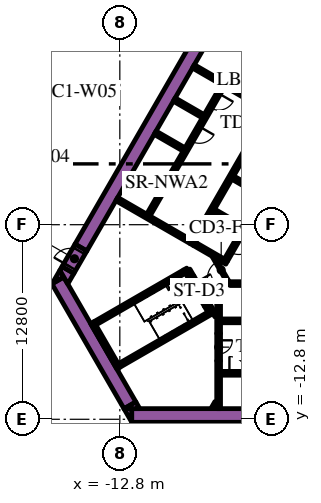
"""IFC4 building model, lengths in metres.
Left out: names, types, materials, properties, quantities, classifications, styles, units other than length and angle.
Written with IfcOpenShell. Run it as: python <this file> out.ifc"""

import sys

from ifc_helpers import new_model, si_unit, direction, frame, frame_2d, origin, place, context, subcontext, project, spatial, polyline, rectangle, outline, extrude, element, fill, save


model = new_model("IFC4")
c1 = context("Model", 3, precision=1e-05, world=origin(), true_north=direction((0.0, 1.0)))
c2 = subcontext(c1, "Body", "Model", "MODEL_VIEW")
j1 = project(units=[si_unit("LENGTHUNIT", "METRE"), si_unit("PLANEANGLEUNIT", "RADIAN")], contexts=[c1])
p1 = place(None, origin())
s1 = spatial("IfcSite", under=j1, at=p1, CompositionType="ELEMENT")
p2 = place(p1, origin())
s2 = spatial("IfcBuilding", under=s1, at=p2, CompositionType="ELEMENT")
p3 = place(p2, frame((0.0, 0.0, 21.6)))
s3 = spatial("IfcBuildingStorey", under=s2, at=p3, CompositionType="ELEMENT", Elevation=21.6)
p4 = place(p3, frame((-15.36, -1.503, 0.0), z_axis=(0.0, 0.0, 1.0), x_axis=(0.50000389221, 0.866023156604, 0.0)))
e1 = element("IfcWall", 1, at=p4, inside=s3, PredefinedType="SOLIDWALL", context=c2, shape_type="SweptSolid", body=[
    extrude(rectangle(XDim=21.0, YDim=0.9, at=frame_2d((10.5, 0.0))), origin(), (0.0, 0.0, 1.0), 6.0),
])
p5 = place(p3, frame((-12.019, -12.55, 0.0), z_axis=(0.0, 0.0, 1.0), x_axis=(1.0, 0.0, 0.0)))
e2 = element("IfcWall", 2, at=p5, inside=s3, PredefinedType="SOLIDWALL", context=c2, shape_type="SweptSolid", body=[
    extrude(rectangle(XDim=21.63, YDim=0.9, at=frame_2d((10.815, 0.0))), origin(), (0.0, 0.0, 1.0), 6.0),
])
p6 = place(p3, origin())
e3 = element("IfcWall", 3, at=p6, inside=s3, PredefinedType="SOLIDWALL", context=c2, shape_type="SweptSolid", body=[
    extrude(outline(polyline([(-12.529, -12.1), (-12.021, -12.1), (-12.021, -12.98), (-12.529, -12.1)])), origin(), (0.0, 0.0, 1.0), 6.0),
])
p7 = place(p3, frame((-12.134, -11.883, 0.0), z_axis=(0.0, 0.0, 1.0), x_axis=(-0.500005339912, 0.866022320763, 0.0)))
e4 = element("IfcWall", 4, at=p7, inside=s3, PredefinedType="SOLIDWALL", context=c2, shape_type="SweptSolid", body=[
    extrude(rectangle(XDim=9.488, YDim=0.9, at=frame_2d((4.744, 0.0))), origin(), (0.0, 0.0, 1.0), 6.0),
])
e5 = element("IfcWall", 5, at=p6, inside=s3, PredefinedType="SOLIDWALL", context=c2, shape_type="SweptSolid", body=[
    extrude(outline(polyline([(-16.489, -3.44), (-17.251, -3.88), (-16.743, -3.0), (-16.489, -3.44)])), origin(), (0.0, 0.0, 1.0), 6.0),
])
e6 = element("IfcWall", 6, at=p6, inside=s3, PredefinedType="SOLIDWALL", context=c2, shape_type="SweptSolid", body=[
    extrude(outline(polyline([(-11.489, -12.1), (-12.505, -12.1), (-11.743, -11.66), (-11.489, -12.1)])), origin(), (0.0, 0.0, 1.0), 6.0),
])
e7 = element("IfcWall", 7, at=p6, inside=s3, PredefinedType="SOLIDWALL", context=c2, shape_type="SweptSolid", body=[
    extrude(outline(polyline([(-15.82, -3.201), (-16.223, -3.9), (-16.743, -3.0), (-16.599, -2.751), (-15.82, -3.201)])), origin(), (0.0, 0.0, 1.0), 6.0),
])
p8 = place(p3, frame((-12.885, -9.431, 0.0), z_axis=(0.0, 0.0, 1.0), x_axis=(-0.500020560727, 0.866013532718, 0.0)))
e8 = element("IfcWall", 8, at=p8, inside=s3, PredefinedType="SOLIDWALL", context=c2, shape_type="SweptSolid", body=[
    extrude(rectangle(XDim=3.45, YDim=0.25, at=frame_2d((1.725, 0.0))), origin(), (0.0, 0.0, 1.0), 6.0),
])
p9 = place(p3, frame((-14.44, -6.49, 0.0), z_axis=(0.0, 0.0, 1.0), x_axis=(0.866022966069, 0.500004222222, 0.0)))
e9 = element("IfcWall", 9, at=p9, inside=s3, PredefinedType="SOLIDWALL", context=c2, shape_type="SweptSolid", body=[
    extrude(rectangle(XDim=6.8, YDim=0.25, at=frame_2d((3.4, 0.0))), origin(), (0.0, 0.0, 1.0), 6.0),
])
p10 = place(p3, frame((-8.168, -3.503, 0.0), z_axis=(0.0, 0.0, 1.0), x_axis=(-0.499952099219, 0.866053057547, 0.0)))
e10 = element("IfcWall", 10, at=p10, inside=s3, PredefinedType="SOLIDWALL", context=c2, shape_type="SweptSolid", body=[
    extrude(rectangle(XDim=0.675, YDim=0.25, at=frame_2d((0.337, 0.0))), origin(), (0.0, 0.0, 1.0), 6.0),
])
p11 = place(p3, frame((-12.84, -9.261, 0.0), z_axis=(0.0, 0.0, 1.0), x_axis=(0.866016039709, 0.500016218704, 0.0)))
e11 = element("IfcWall", 11, at=p11, inside=s3, PredefinedType="SOLIDWALL", context=c2, shape_type="SweptSolid", body=[
    extrude(rectangle(XDim=7.05, YDim=0.25, at=frame_2d((3.525, 0.0))), origin(), (0.0, 0.0, 1.0), 6.0),
])
p12 = place(p3, frame((-6.905, -5.69, 0.0), z_axis=(0.0, 0.0, 1.0), x_axis=(-0.500402024738, 0.865793170242, 0.0)))
e12 = element("IfcWall", 12, at=p12, inside=s3, PredefinedType="SOLIDWALL", context=c2, shape_type="SweptSolid", body=[
    extrude(rectangle(XDim=0.425, YDim=0.25, at=frame_2d((0.212, 0.0))), origin(), (0.0, 0.0, 1.0), 6.0),
])
p13 = place(p3, frame((-6.3, -12.1, 0.0), z_axis=(0.0, 0.0, 1.0), x_axis=(0.0, 1.0, 0.0)))
e13 = element("IfcWall", 13, at=p13, inside=s3, PredefinedType="SOLIDWALL", context=c2, shape_type="SweptSolid", body=[
    extrude(rectangle(XDim=3.146, YDim=0.25, at=frame_2d((1.573, 0.0))), origin(), (0.0, 0.0, 1.0), 6.0),
])
p14 = place(p3, frame((-5.545, -3.875, 0.0), z_axis=(0.0, 0.0, 1.0), x_axis=(1.0, 0.0, 0.0)))
e14 = element("IfcWall", 14, at=p14, inside=s3, PredefinedType="SOLIDWALL", context=c2, shape_type="SweptSolid", body=[
    extrude(rectangle(XDim=11.97, YDim=0.25, at=frame_2d((5.985, 0.0))), origin(), (0.0, 0.0, 1.0), 6.0),
])
p15 = place(p3, frame((-6.425, -3.875, 0.0), z_axis=(0.0, 0.0, 1.0), x_axis=(1.0, 0.0, 0.0)))
e15 = element("IfcWall", 15, at=p15, inside=s3, PredefinedType="SOLIDWALL", context=c2, shape_type="SweptSolid", body=[
    extrude(rectangle(XDim=0.658, YDim=0.25, at=frame_2d((0.329, 0.0))), origin(), (0.0, 0.0, 1.0), 6.0),
])
p16 = place(p3, frame((-6.3, -4.0, 0.0), z_axis=(0.0, 0.0, 1.0), x_axis=(0.0, -1.0, 0.0)))
e16 = element("IfcWall", 16, at=p16, inside=s3, PredefinedType="SOLIDWALL", context=c2, shape_type="SweptSolid", body=[
    extrude(rectangle(XDim=3.154, YDim=0.25, at=frame_2d((1.577, 0.0))), origin(), (0.0, 0.0, 1.0), 6.0),
])
p17 = place(p3, frame((-8.06, -1.311, 0.0), z_axis=(0.0, 0.0, 1.0), x_axis=(0.50000273126, 0.866023826885, 0.0)))
e17 = element("IfcWall", 17, at=p17, inside=s3, PredefinedType="SOLIDWALL", context=c2, shape_type="SweptSolid", body=[
    extrude(rectangle(XDim=10.33, YDim=0.25, at=frame_2d((5.165, 0.0))), origin(), (0.0, 0.0, 1.0), 6.0),
])
for number, where, z_axis, x_axis in (
    (18, (-5.369, 3.1, 0.0), (0.0, 0.0, 1.0), (0.866, -0.5, 0.0)),
    (19, (-4.724, -0.182, 0.0), (0.0, 0.0, 1.0), (-0.866, 0.5, 0.0)),
):
    element("IfcWall", number, at=place(p3, frame(where, z_axis=z_axis, x_axis=x_axis)), inside=s3, PredefinedType="SOLIDWALL", context=c2, shape_type="SweptSolid", body=[
        extrude(rectangle(XDim=2.2, YDim=0.25, at=frame_2d((1.1, 0.0))), origin(), (0.0, 0.0, 1.0), 6.0),
    ])
e20 = element("IfcWall", 20, at=p6, inside=s3, PredefinedType="SOLIDWALL", context=c2, shape_type="SweptSolid", body=[
    extrude(outline(polyline([(-5.922, -2.257), (-5.922, -2.257), (-5.705, -2.382), (-5.83, -2.598), (-6.483, -2.221), (-6.591, -2.033), (-6.591, -2.033), (-6.7, -2.096), (-7.952, -1.373), (-7.827, -1.156), (-5.922, -2.257)])), origin(), (0.0, 0.0, 1.0), 6.0),
])
p18 = place(p3, frame((-8.106, -1.14, 0.0), z_axis=(0.0, 0.0, 1.0), x_axis=(-0.866000643155, 0.500042884217, 0.0)))
e21 = element("IfcWall", 21, at=p18, inside=s3, PredefinedType="SOLIDWALL", context=c2, shape_type="SweptSolid", body=[
    extrude(rectangle(XDim=5.65, YDim=0.25, at=frame_2d((2.825, 0.0))), origin(), (0.0, 0.0, 1.0), 6.0),
])
for number, where, z_axis, x_axis in (
    (22, (-8.574, 4.95, 0.0), (0.0, 0.0, 1.0), (-0.866, 0.5, 0.0)),
    (23, (-7.314, 7.132, 0.0), (0.0, 0.0, 1.0), (-0.866, 0.5, 0.0)),
):
    element("IfcWall", number, at=place(p3, frame(where, z_axis=z_axis, x_axis=x_axis)), inside=s3, PredefinedType="SOLIDWALL", context=c2, shape_type="SweptSolid", body=[
        extrude(rectangle(XDim=2.2, YDim=0.25, at=frame_2d((1.1, 0.0))), origin(), (0.0, 0.0, 1.0), 6.0),
    ])
p19 = place(p3, frame((-7.959, 10.415, 0.0), z_axis=(0.0, 0.0, 1.0), x_axis=(0.866020958405, -0.500007699544, 0.0)))
e24 = element("IfcWall", 24, at=p19, inside=s3, PredefinedType="SOLIDWALL", context=c2, shape_type="SweptSolid", body=[
    extrude(rectangle(XDim=4.1, YDim=0.25, at=frame_2d((2.05, 0.0))), origin(), (0.0, 0.0, 1.0), 6.0),
])
p20 = place(p3, frame((-6.708, -12.068, 0.0), z_axis=(0.0, 0.0, 1.0), x_axis=(0.500000789788, 0.8660249478, 0.0)))
e25 = element("IfcWall", 25, at=p20, inside=s3, PredefinedType="PARTITIONING", context=c2, shape_type="SweptSolid", body=[
    extrude(rectangle(XDim=0.456, YDim=0.15, at=frame_2d((0.228, 0.0))), origin(), (0.0, 0.0, 1.0), 4.85),
])
p21 = place(p3, frame((-6.534, -12.068, 0.0), z_axis=(0.0, 0.0, 1.0), x_axis=(0.500240224089, 0.865886665912, 0.0)))
e26 = element("IfcWall", 26, at=p21, inside=s3, PredefinedType="PARTITIONING", context=c2, shape_type="SweptSolid", body=[
    extrude(rectangle(XDim=0.109, YDim=0.15, at=frame_2d((0.054, 0.0))), origin(), (0.0, 0.0, 1.0), 4.85),
])
p22 = place(p3, frame((-6.48, -6.027, 0.0), z_axis=(0.0, 0.0, 1.0), x_axis=(-0.499927229454, 0.866067413802, 0.0)))
e27 = element("IfcWall", 27, at=p22, inside=s3, PredefinedType="PARTITIONING", context=c2, shape_type="SweptSolid", body=[
    extrude(rectangle(XDim=0.929, YDim=0.15, at=frame_2d((0.464, 0.0))), origin(), (0.0, 0.0, 1.0), 6.0),
])
p23 = place(p3, frame((-8.252, -2.958, 0.0), z_axis=(0.0, 0.0, 1.0), x_axis=(0.500174715838, -0.865924508047, 0.0)))
e28 = element("IfcWall", 28, at=p23, inside=s3, PredefinedType="PARTITIONING", context=c2, shape_type="SweptSolid", body=[
    extrude(rectangle(XDim=0.514, YDim=0.15, at=frame_2d((0.257, 0.0))), origin(), (0.0, 0.0, 1.0), 4.85),
])
p24 = place(p3, frame((-6.175, -9.775, 0.0), z_axis=(0.0, 0.0, 1.0), x_axis=(1.0, 0.0, 0.0)))
e29 = element("IfcWall", 29, at=p24, inside=s3, PredefinedType="SOLIDWALL", context=c2, shape_type="SweptSolid", body=[
    extrude(rectangle(XDim=12.35, YDim=0.25, at=frame_2d((6.175, 0.0))), origin(), (0.0, 0.0, 1.0), 6.0),
])
p25 = place(p24, frame((0.585, 0.0, 0.0)))
e30 = element("IfcOpeningElement", 30, at=p25, cuts=e29, PredefinedType="OPENING", context=c2, shape_type="SweptSolid", body=[
    extrude(rectangle(XDim=1.1, YDim=2.1, at=frame_2d((0.55, 1.05))), frame((0.0, 0.135, 0.0), z_axis=(0.0, -1.0, 0.0), x_axis=(1.0, 0.0, 0.0)), (0.0, 0.0, 1.0), 0.27),
])
p26 = place(p24, frame((3.105, 0.0, 0.0)))
e31 = element("IfcOpeningElement", 31, at=p26, cuts=e29, PredefinedType="OPENING", context=c2, shape_type="SweptSolid", body=[
    extrude(rectangle(XDim=1.1, YDim=2.1, at=frame_2d((0.55, 1.05))), frame((0.0, 0.135, 0.0), z_axis=(0.0, -1.0, 0.0), x_axis=(1.0, 0.0, 0.0)), (0.0, 0.0, 1.0), 0.27),
])
p27 = place(p24, frame((5.625, 0.0, 0.0)))
e32 = element("IfcOpeningElement", 32, at=p27, cuts=e29, PredefinedType="OPENING", context=c2, shape_type="SweptSolid", body=[
    extrude(rectangle(XDim=1.1, YDim=2.1, at=frame_2d((0.55, 1.05))), frame((0.0, 0.135, 0.0), z_axis=(0.0, -1.0, 0.0), x_axis=(1.0, 0.0, 0.0)), (0.0, 0.0, 1.0), 0.27),
])
p28 = place(p24, frame((8.145, 0.0, 0.0)))
e33 = element("IfcOpeningElement", 33, at=p28, cuts=e29, PredefinedType="OPENING", context=c2, shape_type="SweptSolid", body=[
    extrude(rectangle(XDim=1.1, YDim=2.1, at=frame_2d((0.55, 1.05))), frame((0.0, 0.135, 0.0), z_axis=(0.0, -1.0, 0.0), x_axis=(1.0, 0.0, 0.0)), (0.0, 0.0, 1.0), 0.27),
])
p29 = place(p24, frame((10.665, 0.0, 0.0)))
e34 = element("IfcOpeningElement", 34, at=p29, cuts=e29, PredefinedType="OPENING", context=c2, shape_type="SweptSolid", body=[
    extrude(rectangle(XDim=1.1, YDim=2.1, at=frame_2d((0.55, 1.05))), frame((0.0, 0.135, 0.0), z_axis=(0.0, -1.0, 0.0), x_axis=(1.0, 0.0, 0.0)), (0.0, 0.0, 1.0), 0.27),
])
p30 = place(p3, frame((-6.175, -6.325, 0.0), z_axis=(0.0, 0.0, 1.0), x_axis=(1.0, 0.0, 0.0)))
e35 = element("IfcWall", 35, at=p30, inside=s3, PredefinedType="SOLIDWALL", context=c2, shape_type="SweptSolid", body=[
    extrude(rectangle(XDim=12.35, YDim=0.25, at=frame_2d((6.175, 0.0))), origin(), (0.0, 0.0, 1.0), 6.0),
])
p31 = place(p30, frame((3.205, 0.0, 0.0)))
e36 = element("IfcOpeningElement", 36, at=p31, cuts=e35, PredefinedType="OPENING", context=c2, shape_type="SweptSolid", body=[
    extrude(rectangle(XDim=0.9, YDim=2.1, at=frame_2d((0.45, 1.05))), frame((0.0, 0.135, 0.0), z_axis=(0.0, -1.0, 0.0), x_axis=(1.0, 0.0, 0.0)), (0.0, 0.0, 1.0), 0.27),
])
p32 = place(p30, frame((8.145, 0.0, 0.0)))
e37 = element("IfcOpeningElement", 37, at=p32, cuts=e35, PredefinedType="OPENING", context=c2, shape_type="SweptSolid", body=[
    extrude(rectangle(XDim=1.1, YDim=2.1, at=frame_2d((0.55, 1.05))), frame((0.0, 0.135, 0.0), z_axis=(0.0, -1.0, 0.0), x_axis=(1.0, 0.0, 0.0)), (0.0, 0.0, 1.0), 0.27),
])
p33 = place(p30, frame((10.665, 0.0, 0.0)))
e38 = element("IfcOpeningElement", 38, at=p33, cuts=e35, PredefinedType="OPENING", context=c2, shape_type="SweptSolid", body=[
    extrude(rectangle(XDim=1.1, YDim=2.1, at=frame_2d((0.55, 1.05))), frame((0.0, 0.135, 0.0), z_axis=(0.0, -1.0, 0.0), x_axis=(1.0, 0.0, 0.0)), (0.0, 0.0, 1.0), 0.27),
])
p34 = place(p3, frame((-6.008, 9.144, 0.0), z_axis=(0.0, 0.0, 1.0), x_axis=(-0.500006956611, -0.866021387346, 0.0)))
e39 = element("IfcWall", 39, at=p34, inside=s3, PredefinedType="SOLIDWALL", context=c2, shape_type="SweptSolid", body=[
    extrude(rectangle(XDim=9.83, YDim=0.25, at=frame_2d((4.915, 0.0))), origin(), (0.0, 0.0, 1.0), 6.0),
])
p35 = place(p34, frame((0.585, 0.0, 0.0)))
e40 = element("IfcOpeningElement", 40, at=p35, cuts=e39, PredefinedType="OPENING", context=c2, shape_type="SweptSolid", body=[
    extrude(rectangle(XDim=1.1, YDim=2.1, at=frame_2d((0.55, 1.05))), frame((0.0, 0.135, 0.0), z_axis=(0.0, -1.0, 0.0), x_axis=(1.0, 0.0, 0.0)), (0.0, 0.0, 1.0), 0.27),
])
p36 = place(p34, frame((3.105, 0.0, 0.0)))
e41 = element("IfcOpeningElement", 41, at=p36, cuts=e39, PredefinedType="OPENING", context=c2, shape_type="SweptSolid", body=[
    extrude(rectangle(XDim=1.1, YDim=2.1, at=frame_2d((0.55, 1.05))), frame((0.0, 0.135, 0.0), z_axis=(0.0, -1.0, 0.0), x_axis=(1.0, 0.0, 0.0)), (0.0, 0.0, 1.0), 0.27),
])
p37 = place(p34, frame((6.985, 0.0, 0.0)))
e42 = element("IfcOpeningElement", 42, at=p37, cuts=e39, PredefinedType="OPENING", context=c2, shape_type="SweptSolid", body=[
    extrude(rectangle(XDim=0.9, YDim=2.1, at=frame_2d((0.45, 1.05))), frame((0.0, 0.135, 0.0), z_axis=(0.0, -1.0, 0.0), x_axis=(1.0, 0.0, 0.0)), (0.0, 0.0, 1.0), 0.27),
])
p38 = place(p3, frame((-0.898, 6.194, 0.0), z_axis=(0.0, 0.0, 1.0), x_axis=(-0.499996202215, -0.866027596426, 0.0)))
e43 = element("IfcWall", 43, at=p38, inside=s3, PredefinedType="SOLIDWALL", context=c2, shape_type="SweptSolid", body=[
    extrude(rectangle(XDim=9.83, YDim=0.25, at=frame_2d((4.915, 0.0))), origin(), (0.0, 0.0, 1.0), 6.0),
])
p39 = place(p38, frame((0.585, 0.0, 0.0)))
e44 = element("IfcOpeningElement", 44, at=p39, cuts=e43, PredefinedType="OPENING", context=c2, shape_type="SweptSolid", body=[
    extrude(rectangle(XDim=1.1, YDim=2.1, at=frame_2d((0.55, 1.05))), frame((0.0, 0.135, 0.0), z_axis=(0.0, -1.0, 0.0), x_axis=(1.0, 0.0, 0.0)), (0.0, 0.0, 1.0), 0.27),
])
p40 = place(p38, frame((3.105, 0.0, 0.0)))
e45 = element("IfcOpeningElement", 45, at=p40, cuts=e43, PredefinedType="OPENING", context=c2, shape_type="SweptSolid", body=[
    extrude(rectangle(XDim=1.1, YDim=2.1, at=frame_2d((0.55, 1.05))), frame((0.0, 0.135, 0.0), z_axis=(0.0, -1.0, 0.0), x_axis=(1.0, 0.0, 0.0)), (0.0, 0.0, 1.0), 0.27),
])
p41 = place(p38, frame((5.625, 0.0, 0.0)))
e46 = element("IfcOpeningElement", 46, at=p41, cuts=e43, PredefinedType="OPENING", context=c2, shape_type="SweptSolid", body=[
    extrude(rectangle(XDim=1.1, YDim=2.1, at=frame_2d((0.55, 1.05))), frame((0.0, 0.135, 0.0), z_axis=(0.0, -1.0, 0.0), x_axis=(1.0, 0.0, 0.0)), (0.0, 0.0, 1.0), 0.27),
])
p42 = place(p38, frame((8.145, 0.0, 0.0)))
e47 = element("IfcOpeningElement", 47, at=p42, cuts=e43, PredefinedType="OPENING", context=c2, shape_type="SweptSolid", body=[
    extrude(rectangle(XDim=1.1, YDim=2.1, at=frame_2d((0.55, 1.05))), frame((0.0, 0.135, 0.0), z_axis=(0.0, -1.0, 0.0), x_axis=(1.0, 0.0, 0.0)), (0.0, 0.0, 1.0), 0.27),
])
p43 = place(p3, frame((-8.103, -3.466, 0.0), z_axis=(0.0, 0.0, 1.0), x_axis=(0.500078061341, -0.865980330357, 0.0)))
e48 = element("IfcWall", 48, at=p43, inside=s3, PredefinedType="SOLIDWALL", context=c2, shape_type="SweptSolid", body=[
    extrude(rectangle(XDim=2.1, YDim=0.4, at=frame_2d((1.05, 0.0))), origin(), (0.0, 0.0, 1.0), 6.0),
])
p44 = place(p43, frame((0.45, 0.0, 0.0)))
e49 = element("IfcOpeningElement", 49, at=p44, cuts=e48, PredefinedType="OPENING", context=c2, shape_type="SweptSolid", body=[
    extrude(rectangle(XDim=1.2, YDim=2.1, at=frame_2d((0.6, 1.05))), frame((0.0, 0.21, 0.0), z_axis=(0.0, -1.0, 0.0), x_axis=(1.0, 0.0, 0.0)), (0.0, 0.0, 1.0), 0.42),
])
p45 = place(p3, frame((-6.3, -7.154, 0.0), z_axis=(0.0, 0.0, 1.0), x_axis=(0.0, -1.0, 0.0)))
e50 = element("IfcWall", 50, at=p45, inside=s3, PredefinedType="SOLIDWALL", context=c2, shape_type="SweptSolid", body=[
    extrude(rectangle(XDim=1.8, YDim=0.25, at=frame_2d((0.9, 0.0))), origin(), (0.0, 0.0, 1.0), 6.0),
])
p46 = place(p45, frame((0.45, 0.0, 0.0)))
e51 = element("IfcOpeningElement", 51, at=p46, cuts=e50, PredefinedType="OPENING", context=c2, shape_type="SweptSolid", body=[
    extrude(rectangle(XDim=0.9, YDim=2.1, at=frame_2d((0.45, 1.05))), frame((0.0, 0.135, 0.0), z_axis=(0.0, -1.0, 0.0), x_axis=(1.0, 0.0, 0.0)), (0.0, 0.0, 1.0), 0.27),
])
p47 = place(p3, frame((-5.606, -3.89, 0.0), z_axis=(0.0, 0.0, 1.0), x_axis=(-0.500027713859, 0.866009402589, 0.0)))
e52 = element("IfcWall", 52, at=p47, inside=s3, PredefinedType="PARTITIONING", context=c2, shape_type="SweptSolid", body=[
    extrude(rectangle(XDim=2.1, YDim=0.15, at=frame_2d((1.05, 0.0))), origin(), (0.0, 0.0, 1.0), 4.85),
])
p48 = place(p47, frame((0.45, 0.0, 0.0)))
e53 = element("IfcOpeningElement", 53, at=p48, cuts=e52, PredefinedType="OPENING", context=c2, shape_type="SweptSolid", body=[
    extrude(rectangle(XDim=1.2, YDim=2.1, at=frame_2d((0.6, 1.05))), frame((0.0, 0.085, 0.0), z_axis=(0.0, -1.0, 0.0), x_axis=(1.0, 0.0, 0.0)), (0.0, 0.0, 1.0), 0.17),
])
p49 = place(p3, frame((-16.209, -2.976, 0.0), z_axis=(0.0, 0.0, 1.0), x_axis=(0.499954529098, 0.86605165483, 0.0)))
e54 = element("IfcWall", 54, at=p49, inside=s3, PredefinedType="SOLIDWALL", context=c2, shape_type="SweptSolid", body=[
    extrude(rectangle(XDim=1.7, YDim=0.9, at=frame_2d((0.85, 0.0))), origin(), (0.0, 0.0, 1.0), 6.0),
])
p50 = place(p49, frame((0.25, 0.0, 0.0)))
e55 = element("IfcOpeningElement", 55, at=p50, cuts=e54, PredefinedType="OPENING", context=c2, shape_type="SweptSolid", body=[
    extrude(rectangle(XDim=1.2, YDim=2.1, at=frame_2d((0.6, 1.05))), frame((0.0, 0.46, 0.0), z_axis=(0.0, -1.0, 0.0), x_axis=(1.0, 0.0, 0.0)), (0.0, 0.0, 1.0), 0.92),
])
p51 = place(p3, frame((-6.875, 40.198, 0.0), z_axis=(0.0, 0.0, 1.0), x_axis=(-0.500000527961, -0.866025098966, 0.0)))
e56 = element("IfcWall", 56, at=p51, inside=s3, PredefinedType="SOLIDWALL", context=c2, shape_type="SweptSolid", body=[
    extrude(rectangle(XDim=62.75, YDim=0.25, at=frame_2d((31.375, 0.0))), origin(), (0.0, 0.0, 1.0), 4.5),
])
p52 = place(p25, origin())
e57 = element("IfcDoor", 57, at=p52, inside=s3, OperationType="DOUBLE_DOOR_SLIDING", PredefinedType="DOOR", context=c2, shape_type="SweptSolid", body=[
    extrude(rectangle(XDim=1.1, YDim=2.1, at=frame_2d((0.55, 1.05))), frame((0.0, 0.025, 0.0), z_axis=(0.0, -1.0, 0.0), x_axis=(1.0, 0.0, 0.0)), (0.0, 0.0, 1.0), 0.05),
])
fill(e30, e57)
p53 = place(p35, origin())
e58 = element("IfcDoor", 58, at=p53, inside=s3, OperationType="DOUBLE_DOOR_SLIDING", PredefinedType="DOOR", context=c2, shape_type="SweptSolid", body=[
    extrude(rectangle(XDim=1.1, YDim=2.1, at=frame_2d((0.55, 1.05))), frame((0.0, 0.025, 0.0), z_axis=(0.0, -1.0, 0.0), x_axis=(1.0, 0.0, 0.0)), (0.0, 0.0, 1.0), 0.05),
])
fill(e40, e58)
p54 = place(p36, origin())
e59 = element("IfcDoor", 59, at=p54, inside=s3, OperationType="DOUBLE_DOOR_SLIDING", PredefinedType="DOOR", context=c2, shape_type="SweptSolid", body=[
    extrude(rectangle(XDim=1.1, YDim=2.1, at=frame_2d((0.55, 1.05))), frame((0.0, 0.025, 0.0), z_axis=(0.0, -1.0, 0.0), x_axis=(1.0, 0.0, 0.0)), (0.0, 0.0, 1.0), 0.05),
])
fill(e41, e59)
p55 = place(p37, origin())
e60 = element("IfcDoor", 60, at=p55, inside=s3, OperationType="SINGLE_SWING_LEFT", PredefinedType="DOOR", context=c2, shape_type="SweptSolid", body=[
    extrude(rectangle(XDim=0.9, YDim=2.1, at=frame_2d((0.45, 1.05))), frame((0.0, 0.025, 0.0), z_axis=(0.0, -1.0, 0.0), x_axis=(1.0, 0.0, 0.0)), (0.0, 0.0, 1.0), 0.05),
])
fill(e42, e60)
p56 = place(p42, origin())
e61 = element("IfcDoor", 61, at=p56, inside=s3, OperationType="DOUBLE_DOOR_SLIDING", PredefinedType="DOOR", context=c2, shape_type="SweptSolid", body=[
    extrude(rectangle(XDim=1.1, YDim=2.1, at=frame_2d((0.55, 1.05))), frame((0.0, 0.025, 0.0), z_axis=(0.0, -1.0, 0.0), x_axis=(1.0, 0.0, 0.0)), (0.0, 0.0, 1.0), 0.05),
])
fill(e47, e61)
p57 = place(p44, origin())
e62 = element("IfcDoor", 62, at=p57, inside=s3, OperationType="SINGLE_SWING_LEFT", PredefinedType="DOOR", context=c2, shape_type="SweptSolid", body=[
    extrude(rectangle(XDim=1.2, YDim=2.1, at=frame_2d((0.6, 1.05))), frame((0.0, 0.025, 0.0), z_axis=(0.0, -1.0, 0.0), x_axis=(1.0, 0.0, 0.0)), (0.0, 0.0, 1.0), 0.05),
])
fill(e49, e62)
p58 = place(p46, origin())
e63 = element("IfcDoor", 63, at=p58, inside=s3, OperationType="SINGLE_SWING_LEFT", PredefinedType="DOOR", context=c2, shape_type="SweptSolid", body=[
    extrude(rectangle(XDim=0.9, YDim=2.1, at=frame_2d((0.45, 1.05))), frame((0.0, 0.025, 0.0), z_axis=(0.0, -1.0, 0.0), x_axis=(1.0, 0.0, 0.0)), (0.0, 0.0, 1.0), 0.05),
])
fill(e51, e63)
p59 = place(p48, origin())
e64 = element("IfcDoor", 64, at=p59, inside=s3, OperationType="SINGLE_SWING_LEFT", PredefinedType="DOOR", context=c2, shape_type="SweptSolid", body=[
    extrude(rectangle(XDim=1.2, YDim=2.1, at=frame_2d((0.6, 1.05))), frame((0.0, 0.025, 0.0), z_axis=(0.0, -1.0, 0.0), x_axis=(1.0, 0.0, 0.0)), (0.0, 0.0, 1.0), 0.05),
])
fill(e53, e64)
p60 = place(p50, origin())
e65 = element("IfcDoor", 65, at=p60, inside=s3, OperationType="SINGLE_SWING_LEFT", PredefinedType="DOOR", context=c2, shape_type="SweptSolid", body=[
    extrude(rectangle(XDim=1.2, YDim=2.1, at=frame_2d((0.6, 1.05))), frame((0.0, 0.025, 0.0), z_axis=(0.0, -1.0, 0.0), x_axis=(1.0, 0.0, 0.0)), (0.0, 0.0, 1.0), 0.05),
])
fill(e55, e65)
save(model, sys.argv[1])
